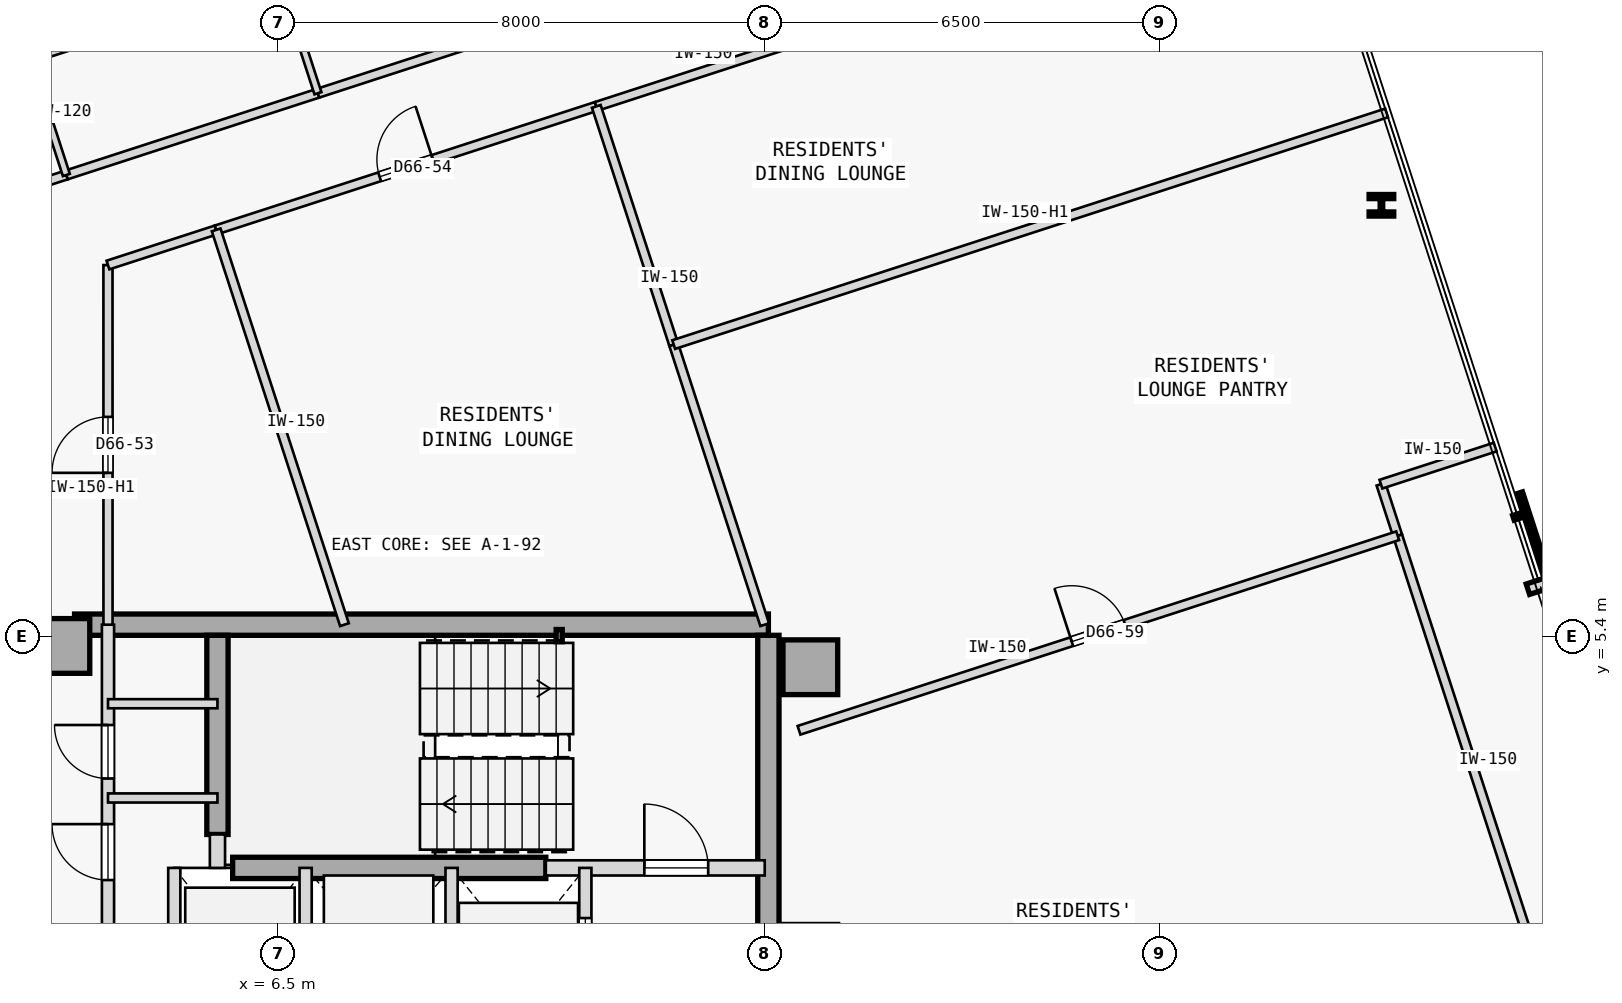
"""IFC4 building model, lengths in metres.
Left out: names, types, materials, properties, quantities, classifications, styles, units other than length and angle.
Written with IfcOpenShell. Run it as: python <this file> out.ifc"""

import sys

from ifc_helpers import new_model, si_unit, direction, frame, frame_2d, origin, origin_2d, place, context, subcontext, project, spatial, rectangle, hollow_rectangle, i_section, extrude, element, fill, save


model = new_model("IFC4")
c1 = context("Model", 3, precision=1e-05, world=origin(), true_north=direction((0.0, 1.0)))
c2 = subcontext(c1, "Body", "Model", "MODEL_VIEW")
j1 = project(units=[si_unit("LENGTHUNIT", "METRE"), si_unit("PLANEANGLEUNIT", "RADIAN")], contexts=[c1])
p1 = place(None, origin())
s1 = spatial("IfcSite", under=j1, at=p1, CompositionType="ELEMENT")
p2 = place(p1, origin())
s2 = spatial("IfcBuilding", under=s1, at=p2, CompositionType="ELEMENT")
p3 = place(p2, frame((0.0, 0.0, 247.75)))
s3 = spatial("IfcBuildingStorey", under=s2, at=p3, CompositionType="ELEMENT", Elevation=247.75)
for number, where, z_axis, x_axis in (
    (1, (15.25, 4.9, 0.0), (0.0, 0.0, 1.0), (1.0, 0.0, 0.0)),
    (2, (2.95, 5.25, 0.0), (0.0, 0.0, 1.0), (1.0, 0.0, 0.0)),
):
    element("IfcColumn", number, at=place(p3, frame(where, z_axis=z_axis, x_axis=x_axis)), inside=s3, PredefinedType="COLUMN", context=c2, shape_type="SweptSolid", body=[
        extrude(rectangle(XDim=0.9, YDim=0.9, at=origin_2d()), origin(), (0.0, 0.0, 1.0), 3.35),
    ])
p4 = place(p3, frame((3.15, 5.6, 0.0), z_axis=(0.0, 0.0, 1.0), x_axis=(1.0, 0.0, 0.0)))
e3 = element("IfcWall", 3, at=p4, inside=s3, PredefinedType="SHEAR", context=c2, shape_type="SweptSolid", body=[
    extrude(rectangle(XDim=11.41, YDim=0.35, at=frame_2d((5.705, 0.0))), origin(), (0.0, 0.0, 1.0), 3.125),
])
p5 = place(p3, frame((14.56, -5.425, 0.0), z_axis=(0.0, 0.0, 1.0), x_axis=(0.0, 1.0, 0.0)))
e4 = element("IfcWall", 4, at=p5, inside=s3, PredefinedType="SHEAR", context=c2, shape_type="SweptSolid", body=[
    extrude(rectangle(XDim=10.85, YDim=0.35, at=frame_2d((5.425, 0.0))), origin(), (0.0, 0.0, 1.0), 3.125),
])
p6 = place(p3, frame((5.5, 2.15, 0.0), z_axis=(0.0, 0.0, 1.0), x_axis=(0.0, 1.0, 0.0)))
e5 = element("IfcWall", 5, at=p6, inside=s3, PredefinedType="SHEAR", context=c2, shape_type="SweptSolid", body=[
    extrude(rectangle(XDim=3.275, YDim=0.35, at=frame_2d((1.638, 0.0))), origin(), (0.0, 0.0, 1.0), 3.125),
])
p7 = place(p3, frame((5.75, 1.6, 0.0), z_axis=(0.0, 0.0, 1.0), x_axis=(1.0, 0.0, 0.0)))
e6 = element("IfcWall", 6, at=p7, inside=s3, PredefinedType="SHEAR", context=c2, shape_type="SweptSolid", body=[
    extrude(rectangle(XDim=5.15, YDim=0.35, at=frame_2d((2.575, 0.0))), origin(), (0.0, 0.0, 1.0), 3.125),
])
p8 = place(p3, frame((11.12, 5.42, 0.0), z_axis=(0.0, 0.0, 1.0), x_axis=(1.0, 0.0, 0.0)))
e7 = element("IfcColumn", 7, at=p8, inside=s3, PredefinedType="COLUMN", context=c2, shape_type="SweptSolid", body=[
    extrude(hollow_rectangle(XDim=0.1, YDim=0.2, WallThickness=0.008, at=origin_2d()), origin(), (0.0, 0.0, 1.0), 3.35),
])
p9 = place(p3, frame((24.642, 12.497, 0.0), z_axis=(0.0, 0.0, 1.0), x_axis=(1.0, 0.0, 0.0)))
e8 = element("IfcColumn", 8, at=p9, inside=s3, PredefinedType="COLUMN", context=c2, shape_type="SweptSolid", body=[
    extrude(i_section(OverallWidth=0.405, OverallDepth=0.355, WebThickness=0.042, FlangeThickness=0.068, FilletRadius=0.015, at=origin_2d()), origin(), (0.0, 0.0, 1.0), 3.35),
])
p10 = place(p3, frame((10.9, 1.6, 0.0), z_axis=(0.0, 0.0, 1.0), x_axis=(1.0, 0.0, 0.0)))
e9 = element("IfcWall", 9, at=p10, inside=s3, PredefinedType="STANDARD", context=c2, shape_type="SweptSolid", body=[
    extrude(rectangle(XDim=3.6, YDim=0.25, at=frame_2d((1.8, 0.0))), origin(), (0.0, 0.0, 1.0), 3.125),
])
p11 = place(p10, frame((1.62, 0.0, 0.0)))
e10 = element("IfcOpeningElement", 10, at=p11, cuts=e9, PredefinedType="OPENING", context=c2, shape_type="SweptSolid", body=[
    extrude(rectangle(XDim=1.05, YDim=2.15, at=frame_2d((0.525, 1.075))), frame((0.0, 0.135, 0.0), z_axis=(0.0, -1.0, 0.0), x_axis=(1.0, 0.0, 0.0)), (0.0, 0.0, 1.0), 0.27),
])
p12 = place(p3, frame((5.5, 1.6, 0.0), z_axis=(0.0, 0.0, 1.0), x_axis=(0.0, 1.0, 0.0)))
e11 = element("IfcWall", 11, at=p12, inside=s3, PredefinedType="STANDARD", context=c2, shape_type="SweptSolid", body=[
    extrude(rectangle(XDim=0.55, YDim=0.25, at=frame_2d((0.275, 0.0))), origin(), (0.0, 0.0, 1.0), 3.125),
])
p13 = place(p3, frame((3.7, -1.15, 0.0), z_axis=(0.0, 0.0, 1.0), x_axis=(0.0, 1.0, 0.0)))
e12 = element("IfcWall", 12, at=p13, inside=s3, PredefinedType="STANDARD", context=c2, shape_type="SweptSolid", body=[
    extrude(rectangle(XDim=6.75, YDim=0.2, at=frame_2d((3.375, 0.0))), origin(), (0.0, 0.0, 1.0), 3.125),
])
p14 = place(p13, frame((0.35, 0.0, 0.0)))
e13 = element("IfcOpeningElement", 13, at=p14, cuts=e12, PredefinedType="OPENING", context=c2, shape_type="SweptSolid", body=[
    extrude(rectangle(XDim=0.88, YDim=2.15, at=frame_2d((0.44, 1.075))), frame((0.0, 0.11, 0.0), z_axis=(0.0, -1.0, 0.0), x_axis=(1.0, 0.0, 0.0)), (0.0, 0.0, 1.0), 0.22),
])
p15 = place(p13, frame((2.55, 0.0, 0.0)))
e14 = element("IfcOpeningElement", 14, at=p15, cuts=e12, PredefinedType="OPENING", context=c2, shape_type="SweptSolid", body=[
    extrude(rectangle(XDim=0.92, YDim=2.15, at=frame_2d((0.46, 1.075))), frame((0.0, 0.11, 0.0), z_axis=(0.0, -1.0, 0.0), x_axis=(1.0, 0.0, 0.0)), (0.0, 0.0, 1.0), 0.22),
])
p16 = place(p13, frame((4.22, 0.0, 0.0)))
e15 = element("IfcOpeningElement", 15, at=p16, cuts=e12, PredefinedType="OPENING", context=c2, shape_type="SweptSolid", body=[
    extrude(rectangle(XDim=0.88, YDim=2.15, at=frame_2d((0.44, 1.075))), frame((0.0, 0.11, 0.0), z_axis=(0.0, -1.0, 0.0), x_axis=(1.0, 0.0, 0.0)), (0.0, 0.0, 1.0), 0.22),
])
p17 = place(p3, frame((11.55, -1.15, 0.0), z_axis=(0.0, 0.0, 1.0), x_axis=(0.0, 1.0, 0.0)))
e16 = element("IfcWall", 16, at=p17, inside=s3, PredefinedType="STANDARD", context=c2, shape_type="SweptSolid", body=[
    extrude(rectangle(XDim=2.75, YDim=0.2, at=frame_2d((1.375, 0.0))), origin(), (0.0, 0.0, 1.0), 3.125),
])
p18 = place(p17, frame((0.825, 0.0, 0.0)))
e17 = element("IfcOpeningElement", 17, at=p18, cuts=e16, PredefinedType="OPENING", context=c2, shape_type="SweptSolid", body=[
    extrude(rectangle(XDim=1.1, YDim=2.15, at=frame_2d((0.55, 1.075))), frame((0.0, 0.11, 0.0), z_axis=(0.0, -1.0, 0.0), x_axis=(1.0, 0.0, 0.0)), (0.0, 0.0, 1.0), 0.22),
])
for number, where, z_axis, x_axis in (
    (18, (9.35, -1.15, 0.0), (0.0, 0.0, 1.0), (0.0, 1.0, 0.0)),
    (19, (6.95, -1.15, 0.0), (0.0, 0.0, 1.0), (0.0, 1.0, 0.0)),
    (20, (4.79, -1.15, 0.0), (0.0, 0.0, 1.0), (0.0, 1.0, 0.0)),
):
    element("IfcWall", number, at=place(p3, frame(where, z_axis=z_axis, x_axis=x_axis)), inside=s3, PredefinedType="STANDARD", context=c2, shape_type="SweptSolid", body=[
        extrude(rectangle(XDim=2.75, YDim=0.2, at=frame_2d((1.375, 0.0))), origin(), (0.0, 0.0, 1.0), 3.125),
    ])
for number, where, z_axis, x_axis in (
    (21, (3.7, 4.3, 0.0), (0.0, 0.0, 1.0), (1.0, 0.0, 0.0)),
    (22, (3.7, 2.75, 0.0), (0.0, 0.0, 1.0), (1.0, 0.0, 0.0)),
):
    element("IfcWall", number, at=place(p3, frame(where, z_axis=z_axis, x_axis=x_axis)), inside=s3, PredefinedType="PARTITIONING", context=c2, shape_type="SweptSolid", body=[
        extrude(rectangle(XDim=1.8, YDim=0.15, at=frame_2d((0.9, 0.0))), origin(), (0.0, 0.0, 1.0), 3.125),
    ])
p19 = place(p3, frame((0.781, 12.269, 0.0), z_axis=(0.0, 0.0, 1.0), x_axis=(0.951066131077, 0.308987401554, 0.0)))
e23 = element("IfcWall", 23, at=p19, inside=s3, PredefinedType="PARTITIONING", context=c2, shape_type="SweptSolid", body=[
    extrude(rectangle(XDim=2.35, YDim=0.15, at=frame_2d((1.175, 0.0))), origin(), (0.0, 0.0, 1.0), 3.125),
])
p20 = place(p3, frame((3.015, 12.995, 0.0), z_axis=(0.0, 0.0, 1.0), x_axis=(0.951052627573, 0.309028962374, 0.0)))
e24 = element("IfcWall", 24, at=p20, inside=s3, PredefinedType="PARTITIONING", context=c2, shape_type="SweptSolid", body=[
    extrude(rectangle(XDim=4.35, YDim=0.15, at=frame_2d((2.175, 0.0))), origin(), (0.0, 0.0, 1.0), 3.125),
])
p21 = place(p3, frame((7.152, 14.339, 0.0), z_axis=(0.0, 0.0, 1.0), x_axis=(0.951062257173, 0.308999325213, 0.0)))
e25 = element("IfcWall", 25, at=p21, inside=s3, PredefinedType="PARTITIONING", context=c2, shape_type="SweptSolid", body=[
    extrude(rectangle(XDim=3.5, YDim=0.15, at=frame_2d((1.75, 0.0))), origin(), (0.0, 0.0, 1.0), 3.125),
])
p22 = place(p3, frame((3.7, 5.6, 0.0), z_axis=(0.0, 0.0, 1.0), x_axis=(-0.000123839008, 0.999999992332, 0.0)))
e26 = element("IfcWall", 26, at=p22, inside=s3, PredefinedType="PARTITIONING", context=c2, shape_type="SweptSolid", body=[
    extrude(rectangle(XDim=5.914, YDim=0.15, at=frame_2d((2.957, 0.0))), origin(), (0.0, 0.0, 1.0), 2.675),
])
p23 = place(p22, frame((2.497, 0.0, 0.0)))
e27 = element("IfcOpeningElement", 27, at=p23, cuts=e26, PredefinedType="OPENING", context=c2, shape_type="SweptSolid", body=[
    extrude(rectangle(XDim=0.92, YDim=2.15, at=frame_2d((0.46, 1.075))), frame((0.0, 0.085, 0.0), z_axis=(0.0, -1.0, 0.0), x_axis=(1.0, 0.0, 0.0)), (0.0, 0.0, 1.0), 0.17),
])
p24 = place(p3, frame((3.699, 11.514, 0.0), z_axis=(0.0, 0.0, 1.0), x_axis=(0.951069540665, 0.308976906612, 0.0)))
e28 = element("IfcWall", 28, at=p24, inside=s3, PredefinedType="PARTITIONING", context=c2, shape_type="SweptSolid", body=[
    extrude(rectangle(XDim=1.871, YDim=0.15, at=frame_2d((0.936, 0.0))), origin(), (0.0, 0.0, 1.0), 3.125),
])
p25 = place(p3, frame((5.479, 12.092, 0.0), z_axis=(0.0, 0.0, 1.0), x_axis=(0.951051809397, 0.309031480343, 0.0)))
e29 = element("IfcWall", 29, at=p25, inside=s3, PredefinedType="PARTITIONING", context=c2, shape_type="SweptSolid", body=[
    extrude(rectangle(XDim=6.573, YDim=0.15, at=frame_2d((3.287, 0.0))), origin(), (0.0, 0.0, 1.0), 3.125),
])
p26 = place(p25, frame((2.826, 0.0, 0.0)))
e30 = element("IfcOpeningElement", 30, at=p26, cuts=e29, PredefinedType="OPENING", context=c2, shape_type="SweptSolid", body=[
    extrude(rectangle(XDim=0.92, YDim=2.15, at=frame_2d((0.46, 1.075))), frame((0.0, 0.085, 0.0), z_axis=(0.0, -1.0, 0.0), x_axis=(1.0, 0.0, 0.0)), (0.0, 0.0, 1.0), 0.17),
])
p27 = place(p3, frame((27.637, -1.332, 0.0), z_axis=(0.0, 0.0, 1.0), x_axis=(-0.309040411618, 0.951048907253, 0.0)))
e31 = element("IfcWall", 31, at=p27, inside=s3, PredefinedType="PARTITIONING", context=c2, shape_type="SweptSolid", body=[
    extrude(rectangle(XDim=8.826, YDim=0.15, at=frame_2d((4.413, 0.0))), origin(), (0.0, 0.0, 1.0), 3.125),
])
p28 = place(p3, frame((24.909, 7.062, 0.0), z_axis=(0.0, 0.0, 1.0), x_axis=(-0.30899324298, 0.951064233263, 0.0)))
e32 = element("IfcWall", 32, at=p28, inside=s3, PredefinedType="PARTITIONING", context=c2, shape_type="SweptSolid", body=[
    extrude(rectangle(XDim=0.892, YDim=0.15, at=frame_2d((0.446, 0.0))), origin(), (0.0, 0.0, 1.0), 3.125),
])
p29 = place(p3, frame((24.634, 7.91, 0.0), z_axis=(0.0, 0.0, 1.0), x_axis=(0.951054051148, 0.309024581215, 0.0)))
e33 = element("IfcWall", 33, at=p29, inside=s3, PredefinedType="PARTITIONING", context=c2, shape_type="SweptSolid", body=[
    extrude(rectangle(XDim=1.975, YDim=0.15, at=frame_2d((0.988, 0.0))), origin(), (0.0, 0.0, 1.0), 3.125),
])
p30 = place(p3, frame((11.73, 14.123, 0.0), z_axis=(0.0, 0.0, 1.0), x_axis=(0.951060263663, 0.309005460926, 0.0)))
e34 = element("IfcWall", 34, at=p30, inside=s3, PredefinedType="PARTITIONING", context=c2, shape_type="SweptSolid", body=[
    extrude(rectangle(XDim=12.327, YDim=0.15, at=frame_2d((6.164, 0.0))), origin(), (0.0, 0.0, 1.0), 3.125),
])
p31 = place(p30, frame((5.704, 0.0, 0.0)))
e35 = element("IfcOpeningElement", 35, at=p31, cuts=e34, PredefinedType="OPENING", context=c2, shape_type="SweptSolid", body=[
    extrude(rectangle(XDim=0.92, YDim=2.15, at=frame_2d((0.46, 1.075))), frame((0.0, 0.085, 0.0), z_axis=(0.0, -1.0, 0.0), x_axis=(1.0, 0.0, 0.0)), (0.0, 0.0, 1.0), 0.17),
])
p32 = place(p3, frame((2.396, 14.902, 0.0), z_axis=(0.0, 0.0, 1.0), x_axis=(0.951057987102, 0.309012467661, 0.0)))
e36 = element("IfcWall", 36, at=p32, inside=s3, PredefinedType="PARTITIONING", context=c2, shape_type="SweptSolid", body=[
    extrude(rectangle(XDim=4.35, YDim=0.15, at=frame_2d((2.175, 0.0))), origin(), (0.0, 0.0, 1.0), 3.125),
])
p33 = place(p32, frame((1.725, 0.0, 0.0)))
e37 = element("IfcOpeningElement", 37, at=p33, cuts=e36, PredefinedType="OPENING", context=c2, shape_type="SweptSolid", body=[
    extrude(rectangle(XDim=0.9, YDim=2.15, at=frame_2d((0.45, 1.075))), frame((0.0, 0.085, 0.0), z_axis=(0.0, -1.0, 0.0), x_axis=(1.0, 0.0, 0.0)), (0.0, 0.0, 1.0), 0.17),
])
for number, where, z_axis, x_axis in (
    (38, (3.015, 12.995, 0.0), (0.0, 0.0, 1.0), (-0.309, 0.951, 0.0)),
    (39, (7.152, 14.339, 0.0), (0.0, 0.0, 1.0), (-0.309, 0.951, 0.0)),
):
    element("IfcWall", number, at=place(p3, frame(where, z_axis=z_axis, x_axis=x_axis)), inside=s3, PredefinedType="PARTITIONING", context=c2, shape_type="SweptSolid", body=[
        extrude(rectangle(XDim=2.005, YDim=0.12, at=frame_2d((1.002, 0.0))), origin(), (0.0, 0.0, 1.0), 3.125),
    ])
p34 = place(p3, frame((7.588, 5.6, 0.0), z_axis=(0.0, 0.0, 1.0), x_axis=(-0.309018946982, 0.951055881852, 0.0)))
e40 = element("IfcWall", 40, at=p34, inside=s3, PredefinedType="PARTITIONING", context=c2, shape_type="SweptSolid", body=[
    extrude(rectangle(XDim=6.826, YDim=0.15, at=frame_2d((3.413, 0.0))), origin(), (0.0, 0.0, 1.0), 3.125),
])
p35 = place(p3, frame((14.5, 5.6, 0.0), z_axis=(0.0, 0.0, 1.0), x_axis=(-0.308974360462, 0.951070367837, 0.0)))
e41 = element("IfcWall", 41, at=p35, inside=s3, PredefinedType="PARTITIONING", context=c2, shape_type="SweptSolid", body=[
    extrude(rectangle(XDim=4.843, YDim=0.15, at=frame_2d((2.421, 0.0))), origin(), (0.0, 0.0, 1.0), 3.125),
])
p36 = place(p3, frame((13.003, 10.206, 0.0), z_axis=(0.0, 0.0, 1.0), x_axis=(-0.309035144366, 0.951050618814, 0.0)))
e42 = element("IfcWall", 42, at=p36, inside=s3, PredefinedType="PARTITIONING", context=c2, shape_type="SweptSolid", body=[
    extrude(rectangle(XDim=4.119, YDim=0.15, at=frame_2d((2.06, 0.0))), origin(), (0.0, 0.0, 1.0), 3.125),
])
p37 = place(p3, frame((15.064, 3.863, 0.0), z_axis=(0.0, 0.0, 1.0), x_axis=(0.951061448945, 0.309001812827, 0.0)))
e43 = element("IfcWall", 43, at=p37, inside=s3, PredefinedType="PARTITIONING", context=c2, shape_type="SweptSolid", body=[
    extrude(rectangle(XDim=10.352, YDim=0.15, at=frame_2d((5.176, 0.0))), origin(), (0.0, 0.0, 1.0), 3.125),
])
p38 = place(p37, frame((4.716, 0.0, 0.0)))
e44 = element("IfcOpeningElement", 44, at=p38, cuts=e43, PredefinedType="OPENING", context=c2, shape_type="SweptSolid", body=[
    extrude(rectangle(XDim=0.92, YDim=2.15, at=frame_2d((0.46, 1.075))), frame((0.0, 0.085, 0.0), z_axis=(0.0, -1.0, 0.0), x_axis=(1.0, 0.0, 0.0)), (0.0, 0.0, 1.0), 0.17),
])
p39 = place(p3, frame((13.003, 10.206, 0.0), z_axis=(0.0, 0.0, 1.0), x_axis=(0.951060263663, 0.309005460926, 0.0)))
e45 = element("IfcWall", 45, at=p39, inside=s3, PredefinedType="PARTITIONING", context=c2, shape_type="SweptSolid", body=[
    extrude(rectangle(XDim=12.327, YDim=0.15, at=frame_2d((6.164, 0.0))), origin(), (0.0, 0.0, 1.0), 2.675),
])
p40 = place(p11, origin())
e46 = element("IfcDoor", 46, at=p40, inside=s3, OperationType="SINGLE_SWING_LEFT", PredefinedType="DOOR", context=c2, shape_type="SweptSolid", body=[
    extrude(rectangle(XDim=1.05, YDim=2.15, at=frame_2d((0.525, 1.075))), frame((0.0, 0.025, 0.0), z_axis=(0.0, -1.0, 0.0), x_axis=(1.0, 0.0, 0.0)), (0.0, 0.0, 1.0), 0.05),
])
fill(e10, e46)
p41 = place(p18, origin())
e47 = element("IfcDoor", 47, at=p41, inside=s3, OperationType="SLIDING_TO_RIGHT", PredefinedType="DOOR", context=c2, shape_type="SweptSolid", body=[
    extrude(rectangle(XDim=1.1, YDim=2.15, at=frame_2d((0.55, 1.075))), frame((0.0, 0.025, 0.0), z_axis=(0.0, -1.0, 0.0), x_axis=(1.0, 0.0, 0.0)), (0.0, 0.0, 1.0), 0.05),
])
fill(e17, e47)
p42 = place(p15, origin())
e48 = element("IfcDoor", 48, at=p42, inside=s3, OperationType="SINGLE_SWING_RIGHT", PredefinedType="DOOR", context=c2, shape_type="SweptSolid", body=[
    extrude(rectangle(XDim=0.92, YDim=2.15, at=frame_2d((0.46, 1.075))), frame((0.0, 0.025, 0.0), z_axis=(0.0, -1.0, 0.0), x_axis=(1.0, 0.0, 0.0)), (0.0, 0.0, 1.0), 0.05),
])
fill(e14, e48)
p43 = place(p16, origin())
e49 = element("IfcDoor", 49, at=p43, inside=s3, OperationType="SINGLE_SWING_RIGHT", PredefinedType="DOOR", context=c2, shape_type="SweptSolid", body=[
    extrude(rectangle(XDim=0.88, YDim=2.15, at=frame_2d((0.44, 1.075))), frame((0.0, 0.025, 0.0), z_axis=(0.0, -1.0, 0.0), x_axis=(1.0, 0.0, 0.0)), (0.0, 0.0, 1.0), 0.05),
])
fill(e15, e49)
p44 = place(p23, origin())
e50 = element("IfcDoor", 50, at=p44, inside=s3, OperationType="SINGLE_SWING_LEFT", PredefinedType="DOOR", context=c2, shape_type="SweptSolid", body=[
    extrude(rectangle(XDim=0.92, YDim=2.15, at=frame_2d((0.46, 1.075))), frame((0.0, 0.025, 0.0), z_axis=(0.0, -1.0, 0.0), x_axis=(1.0, 0.0, 0.0)), (0.0, 0.0, 1.0), 0.05),
])
fill(e27, e50)
p45 = place(p26, origin())
e51 = element("IfcDoor", 51, at=p45, inside=s3, OperationType="SINGLE_SWING_RIGHT", PredefinedType="DOOR", context=c2, shape_type="SweptSolid", body=[
    extrude(rectangle(XDim=0.92, YDim=2.15, at=frame_2d((0.46, 1.075))), frame((0.0, 0.025, 0.0), z_axis=(0.0, -1.0, 0.0), x_axis=(1.0, 0.0, 0.0)), (0.0, 0.0, 1.0), 0.05),
])
fill(e30, e51)
p46 = place(p38, origin())
e52 = element("IfcDoor", 52, at=p46, inside=s3, OperationType="SINGLE_SWING_LEFT", PredefinedType="DOOR", context=c2, shape_type="SweptSolid", body=[
    extrude(rectangle(XDim=0.92, YDim=2.15, at=frame_2d((0.46, 1.075))), frame((0.0, 0.025, 0.0), z_axis=(0.0, -1.0, 0.0), x_axis=(1.0, 0.0, 0.0)), (0.0, 0.0, 1.0), 0.05),
])
fill(e44, e52)
save(model, sys.argv[1])
